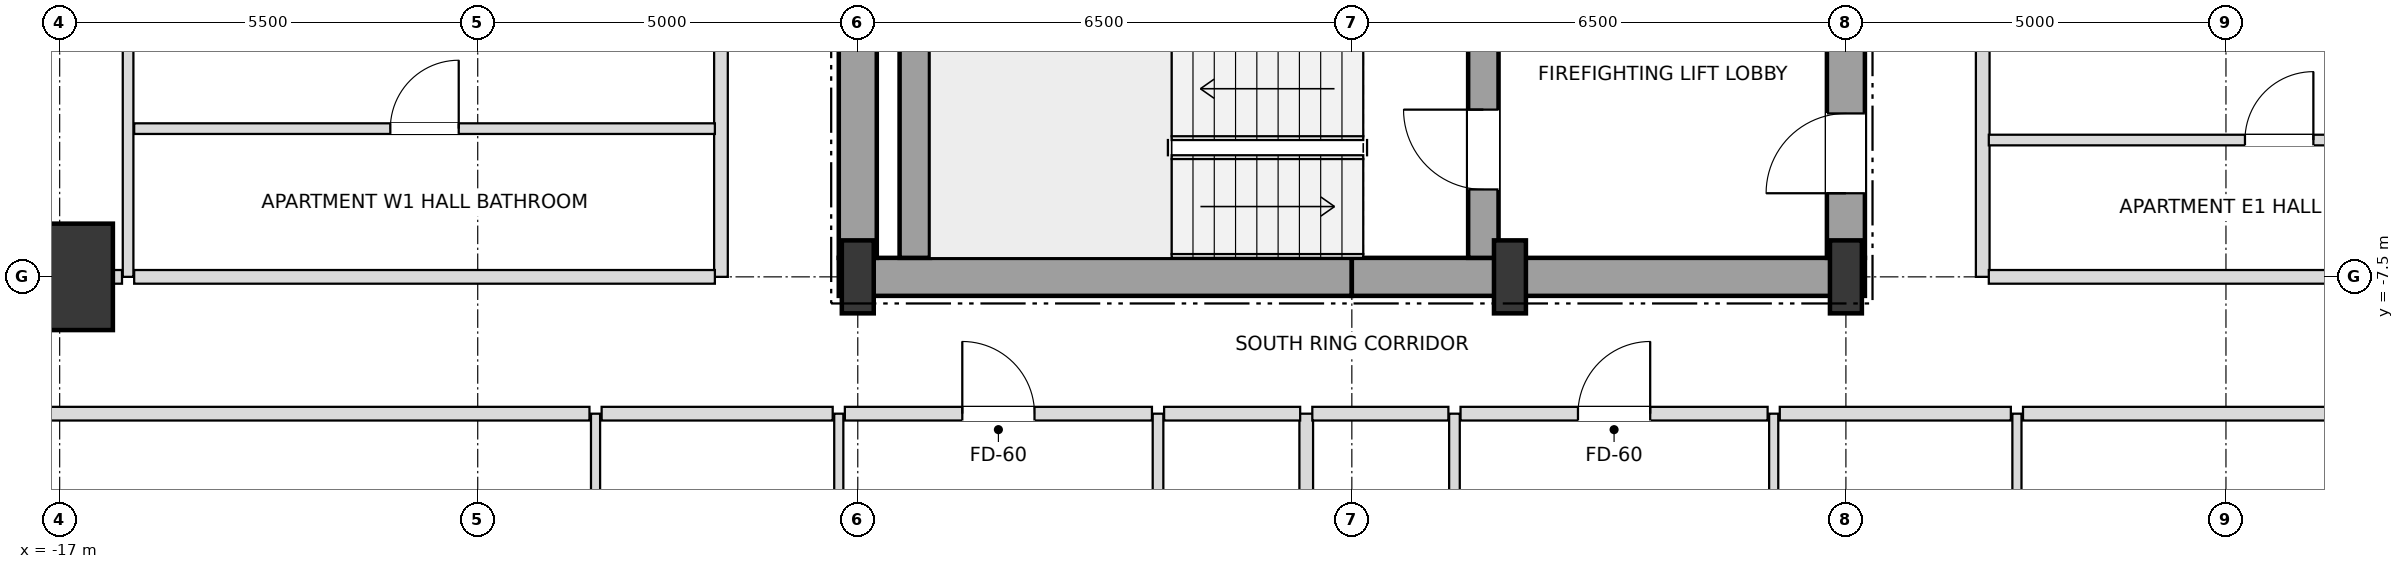
"""IFC4 building model, lengths in metres.
Left out: names, types, materials, properties, quantities, classifications, styles, units other than length and angle.
Written with IfcOpenShell. Run it as: python <this file> out.ifc"""

import sys

from ifc_helpers import new_model, si_unit, direction, frame, frame_2d, origin, origin_2d, place, context, subcontext, project, spatial, rectangle, i_section, extrude, element, fill, save


model = new_model("IFC4")
c1 = context("Model", 3, precision=1e-05, world=origin(), true_north=direction((0.0, 1.0)))
c2 = subcontext(c1, "Body", "Model", "MODEL_VIEW")
j1 = project(units=[si_unit("LENGTHUNIT", "METRE"), si_unit("PLANEANGLEUNIT", "RADIAN")], contexts=[c1])
p1 = place(None, origin())
s1 = spatial("IfcSite", under=j1, at=p1, CompositionType="ELEMENT")
p2 = place(p1, origin())
s2 = spatial("IfcBuilding", under=s1, at=p2, CompositionType="ELEMENT")
p3 = place(p2, frame((0.0, 0.0, 75.6)))
s3 = spatial("IfcBuildingStorey", under=s2, at=p3, CompositionType="ELEMENT", Elevation=75.6)
for number, where, z_axis, x_axis in (
    (1, (-6.5, -7.5, 0.0), (0.0, 0.0, 1.0), (1.0, 0.0, 0.0)),
    (2, (2.08, -7.5, 0.0), (0.0, 0.0, 1.0), (1.0, 0.0, 0.0)),
    (3, (6.5, -7.5, 0.0), (0.0, 0.0, 1.0), (1.0, 0.0, 0.0)),
):
    element("IfcColumn", number, at=place(p3, frame(where, z_axis=z_axis, x_axis=x_axis)), inside=s3, PredefinedType="COLUMN", context=c2, shape_type="SweptSolid", body=[
        extrude(i_section(OverallWidth=0.42, OverallDepth=0.96, WebThickness=0.022, FlangeThickness=0.034, at=origin_2d()), origin(), (0.0, 0.0, 1.0), 3.6),
    ])
p4 = place(p3, frame((-17.0, -7.5, 0.0), z_axis=(0.0, 0.0, 1.0), x_axis=(1.0, 0.0, 0.0)))
e4 = element("IfcColumn", 4, at=p4, inside=s3, PredefinedType="USERDEFINED", context=c2, shape_type="SweptSolid", body=[
    extrude(rectangle(XDim=1.4, YDim=1.4, at=origin_2d()), origin(), (0.0, 0.0, 1.0), 3.6),
])
for number, where, z_axis, x_axis in (
    (5, (-6.75, -7.5, 0.0), (0.0, 0.0, 1.0), (1.0, 0.0, 0.0)),
    (6, (0.0, -7.5, 0.0), (0.0, 0.0, 1.0), (1.0, 0.0, 0.0)),
):
    element("IfcWall", number, at=place(p3, frame(where, z_axis=z_axis, x_axis=x_axis)), inside=s3, PredefinedType="SHEAR", context=c2, shape_type="SweptSolid", body=[
        extrude(rectangle(XDim=6.75, YDim=0.5, at=frame_2d((3.375, 0.0))), origin(), (0.0, 0.0, 1.0), 3.38),
    ])
p5 = place(p3, frame((-6.5, -7.25, 0.0), z_axis=(0.0, 0.0, 1.0), x_axis=(0.0, 1.0, 0.0)))
e7 = element("IfcWall", 7, at=p5, inside=s3, PredefinedType="SHEAR", context=c2, shape_type="SweptSolid", body=[
    extrude(rectangle(XDim=3.55, YDim=0.5, at=frame_2d((1.775, 0.0))), origin(), (0.0, 0.0, 1.0), 3.38),
])
p6 = place(p3, frame((6.5, -7.25, 0.0), z_axis=(0.0, 0.0, 1.0), x_axis=(0.0, 1.0, 0.0)))
e8 = element("IfcWall", 8, at=p6, inside=s3, PredefinedType="SHEAR", context=c2, shape_type="SweptSolid", body=[
    extrude(rectangle(XDim=5.75, YDim=0.5, at=frame_2d((2.875, 0.0))), origin(), (0.0, 0.0, 1.0), 3.38),
])
p7 = place(p6, frame((0.85, 0.0, 0.0)))
e9 = element("IfcOpeningElement", 9, at=p7, cuts=e8, PredefinedType="OPENING", context=c2, shape_type="SweptSolid", body=[
    extrude(rectangle(XDim=1.05, YDim=2.15, at=frame_2d((0.525, 1.075))), frame((0.0, 0.26, 0.0), z_axis=(0.0, -1.0, 0.0), x_axis=(1.0, 0.0, 0.0)), (0.0, 0.0, 1.0), 0.52),
])
p8 = place(p3, frame((-5.75, -7.25, 0.0), z_axis=(0.0, 0.0, 1.0), x_axis=(0.0, 1.0, 0.0)))
e10 = element("IfcWall", 10, at=p8, inside=s3, PredefinedType="SHEAR", context=c2, shape_type="SweptSolid", body=[
    extrude(rectangle(XDim=2.9, YDim=0.4, at=frame_2d((1.45, 0.0))), origin(), (0.0, 0.0, 1.0), 3.38),
])
p9 = place(p3, frame((1.73, -7.25, 0.0), z_axis=(0.0, 0.0, 1.0), x_axis=(0.0, 1.0, 0.0)))
e11 = element("IfcWall", 11, at=p9, inside=s3, PredefinedType="SHEAR", context=c2, shape_type="SweptSolid", body=[
    extrude(rectangle(XDim=3.3, YDim=0.4, at=frame_2d((1.65, 0.0))), origin(), (0.0, 0.0, 1.0), 3.38),
])
p10 = place(p9, frame((0.9, 0.0, 0.0)))
e12 = element("IfcOpeningElement", 12, at=p10, cuts=e11, PredefinedType="OPENING", context=c2, shape_type="SweptSolid", body=[
    extrude(rectangle(XDim=1.05, YDim=2.15, at=frame_2d((0.525, 1.075))), frame((0.0, 0.21, 0.0), z_axis=(0.0, -1.0, 0.0), x_axis=(1.0, 0.0, 0.0)), (0.0, 0.0, 1.0), 0.42),
])
p11 = place(p3, frame((-16.1, -7.5, 0.0), z_axis=(0.0, 0.0, 1.0), x_axis=(0.0, 1.0, 0.0)))
e13 = element("IfcWall", 13, at=p11, inside=s3, PredefinedType="PARTITIONING", context=c2, shape_type="SweptSolid", body=[
    extrude(rectangle(XDim=15.0, YDim=0.14, at=frame_2d((7.5, 0.0))), origin(), (0.0, 0.0, 1.0), 3.38),
])
p12 = place(p11, frame((3.475, 0.0, 0.0)))
e14 = element("IfcOpeningElement", 14, at=p12, cuts=e13, PredefinedType="OPENING", context=c2, shape_type="SweptSolid", body=[
    extrude(rectangle(XDim=0.95, YDim=2.1, at=frame_2d((0.475, 1.05))), frame((0.0, 0.08, 0.0), z_axis=(0.0, -1.0, 0.0), x_axis=(1.0, 0.0, 0.0)), (0.0, 0.0, 1.0), 0.16),
])
p13 = place(p3, frame((-9.95, -18.9, 0.0), z_axis=(0.0, 0.0, 1.0), x_axis=(0.0, 1.0, 0.0)))
e15 = element("IfcWall", 15, at=p13, inside=s3, PredefinedType="PARTITIONING", context=c2, shape_type="SweptSolid", body=[
    extrude(rectangle(XDim=9.6, YDim=0.12, at=frame_2d((4.8, 0.0))), origin(), (0.0, 0.0, 1.0), 2.816),
])
p14 = place(p13, frame((4.35, 0.0, 0.0)))
e16 = element("IfcOpeningElement", 16, at=p14, cuts=e15, PredefinedType="OPENING", context=c2, shape_type="SweptSolid", body=[
    extrude(rectangle(XDim=0.9, YDim=2.1, at=frame_2d((0.45, 1.05))), frame((0.0, 0.07, 0.0), z_axis=(0.0, -1.0, 0.0), x_axis=(1.0, 0.0, 0.0)), (0.0, 0.0, 1.0), 0.14),
])
p15 = place(p3, frame((-8.3, -7.5, 0.0), z_axis=(0.0, 0.0, 1.0), x_axis=(0.0, 1.0, 0.0)))
e17 = element("IfcWall", 17, at=p15, inside=s3, PredefinedType="PARTITIONING", context=c2, shape_type="SweptSolid", body=[
    extrude(rectangle(XDim=15.0, YDim=0.18, at=frame_2d((7.5, 0.0))), origin(), (0.0, 0.0, 1.0), 3.38),
])
p16 = place(p15, frame((3.475, 0.0, 0.0)))
e18 = element("IfcOpeningElement", 18, at=p16, cuts=e17, PredefinedType="OPENING", context=c2, shape_type="SweptSolid", body=[
    extrude(rectangle(XDim=0.95, YDim=2.15, at=frame_2d((0.475, 1.075))), frame((0.0, 0.1, 0.0), z_axis=(0.0, -1.0, 0.0), x_axis=(1.0, 0.0, 0.0)), (0.0, 0.0, 1.0), 0.2),
])
p17 = place(p3, frame((-6.75, -24.9, 0.0), z_axis=(0.0, 0.0, 1.0), x_axis=(0.0, 1.0, 0.0)))
e19 = element("IfcWall", 19, at=p17, inside=s3, PredefinedType="PARTITIONING", context=c2, shape_type="SweptSolid", body=[
    extrude(rectangle(XDim=15.6, YDim=0.12, at=frame_2d((7.8, 0.0))), origin(), (0.0, 0.0, 1.0), 2.816),
])
p18 = place(p17, frame((10.325, 0.0, 0.0)))
e20 = element("IfcOpeningElement", 20, at=p18, cuts=e19, PredefinedType="OPENING", context=c2, shape_type="SweptSolid", body=[
    extrude(rectangle(XDim=0.95, YDim=2.1, at=frame_2d((0.475, 1.05))), frame((0.0, 0.07, 0.0), z_axis=(0.0, -1.0, 0.0), x_axis=(1.0, 0.0, 0.0)), (0.0, 0.0, 1.0), 0.14),
])
p19 = place(p17, frame((2.55, 0.0, 0.0)))
e21 = element("IfcOpeningElement", 21, at=p19, cuts=e19, PredefinedType="OPENING", context=c2, shape_type="SweptSolid", body=[
    extrude(rectangle(XDim=0.9, YDim=2.1, at=frame_2d((0.45, 1.05))), frame((0.0, 0.07, 0.0), z_axis=(0.0, -1.0, 0.0), x_axis=(1.0, 0.0, 0.0)), (0.0, 0.0, 1.0), 0.14),
])
p20 = place(p3, frame((-2.55, -18.9, 0.0), z_axis=(0.0, 0.0, 1.0), x_axis=(0.0, 1.0, 0.0)))
e22 = element("IfcWall", 22, at=p20, inside=s3, PredefinedType="PARTITIONING", context=c2, shape_type="SweptSolid", body=[
    extrude(rectangle(XDim=9.6, YDim=0.14, at=frame_2d((4.8, 0.0))), origin(), (0.0, 0.0, 1.0), 2.948),
])
p21 = place(p20, frame((4.35, 0.0, 0.0)))
e23 = element("IfcOpeningElement", 23, at=p21, cuts=e22, PredefinedType="OPENING", context=c2, shape_type="SweptSolid", body=[
    extrude(rectangle(XDim=0.9, YDim=2.1, at=frame_2d((0.45, 1.05))), frame((0.0, 0.08, 0.0), z_axis=(0.0, -1.0, 0.0), x_axis=(1.0, 0.0, 0.0)), (0.0, 0.0, 1.0), 0.16),
])
p22 = place(p3, frame((-0.6, -24.9, 0.0), z_axis=(0.0, 0.0, 1.0), x_axis=(0.0, 1.0, 0.0)))
e24 = element("IfcWall", 24, at=p22, inside=s3, PredefinedType="PARTITIONING", context=c2, shape_type="SweptSolid", body=[
    extrude(rectangle(XDim=15.6, YDim=0.18, at=frame_2d((7.8, 0.0))), origin(), (0.0, 0.0, 1.0), 2.816),
])
p23 = place(p3, frame((1.35, -18.9, 0.0), z_axis=(0.0, 0.0, 1.0), x_axis=(0.0, 1.0, 0.0)))
e25 = element("IfcWall", 25, at=p23, inside=s3, PredefinedType="PARTITIONING", context=c2, shape_type="SweptSolid", body=[
    extrude(rectangle(XDim=9.6, YDim=0.14, at=frame_2d((4.8, 0.0))), origin(), (0.0, 0.0, 1.0), 2.948),
])
p24 = place(p23, frame((4.35, 0.0, 0.0)))
e26 = element("IfcOpeningElement", 26, at=p24, cuts=e25, PredefinedType="OPENING", context=c2, shape_type="SweptSolid", body=[
    extrude(rectangle(XDim=0.9, YDim=2.1, at=frame_2d((0.45, 1.05))), frame((0.0, 0.08, 0.0), z_axis=(0.0, -1.0, 0.0), x_axis=(1.0, 0.0, 0.0)), (0.0, 0.0, 1.0), 0.16),
])
p25 = place(p3, frame((5.55, -24.9, 0.0), z_axis=(0.0, 0.0, 1.0), x_axis=(0.0, 1.0, 0.0)))
e27 = element("IfcWall", 27, at=p25, inside=s3, PredefinedType="PARTITIONING", context=c2, shape_type="SweptSolid", body=[
    extrude(rectangle(XDim=15.6, YDim=0.12, at=frame_2d((7.8, 0.0))), origin(), (0.0, 0.0, 1.0), 2.816),
])
p26 = place(p25, frame((10.325, 0.0, 0.0)))
e28 = element("IfcOpeningElement", 28, at=p26, cuts=e27, PredefinedType="OPENING", context=c2, shape_type="SweptSolid", body=[
    extrude(rectangle(XDim=0.95, YDim=2.1, at=frame_2d((0.475, 1.05))), frame((0.0, 0.07, 0.0), z_axis=(0.0, -1.0, 0.0), x_axis=(1.0, 0.0, 0.0)), (0.0, 0.0, 1.0), 0.14),
])
p27 = place(p25, frame((2.55, 0.0, 0.0)))
e29 = element("IfcOpeningElement", 29, at=p27, cuts=e27, PredefinedType="OPENING", context=c2, shape_type="SweptSolid", body=[
    extrude(rectangle(XDim=0.9, YDim=2.1, at=frame_2d((0.45, 1.05))), frame((0.0, 0.07, 0.0), z_axis=(0.0, -1.0, 0.0), x_axis=(1.0, 0.0, 0.0)), (0.0, 0.0, 1.0), 0.14),
])
p28 = place(p3, frame((8.3, -7.5, 0.0), z_axis=(0.0, 0.0, 1.0), x_axis=(0.0, 1.0, 0.0)))
e30 = element("IfcWall", 30, at=p28, inside=s3, PredefinedType="PARTITIONING", context=c2, shape_type="SweptSolid", body=[
    extrude(rectangle(XDim=15.0, YDim=0.18, at=frame_2d((7.5, 0.0))), origin(), (0.0, 0.0, 1.0), 3.38),
])
p29 = place(p28, frame((3.305, 0.0, 0.0)))
e31 = element("IfcOpeningElement", 31, at=p29, cuts=e30, PredefinedType="OPENING", context=c2, shape_type="SweptSolid", body=[
    extrude(rectangle(XDim=0.95, YDim=2.15, at=frame_2d((0.475, 1.075))), frame((0.0, 0.1, 0.0), z_axis=(0.0, -1.0, 0.0), x_axis=(1.0, 0.0, 0.0)), (0.0, 0.0, 1.0), 0.2),
])
p30 = place(p28, frame((10.805, 0.0, 0.0)))
e32 = element("IfcOpeningElement", 32, at=p30, cuts=e30, PredefinedType="OPENING", context=c2, shape_type="SweptSolid", body=[
    extrude(rectangle(XDim=0.95, YDim=2.15, at=frame_2d((0.475, 1.075))), frame((0.0, 0.1, 0.0), z_axis=(0.0, -1.0, 0.0), x_axis=(1.0, 0.0, 0.0)), (0.0, 0.0, 1.0), 0.2),
])
p31 = place(p3, frame((8.75, -24.9, 0.0), z_axis=(0.0, 0.0, 1.0), x_axis=(0.0, 1.0, 0.0)))
e33 = element("IfcWall", 33, at=p31, inside=s3, PredefinedType="PARTITIONING", context=c2, shape_type="SweptSolid", body=[
    extrude(rectangle(XDim=15.6, YDim=0.12, at=frame_2d((7.8, 0.0))), origin(), (0.0, 0.0, 1.0), 2.816),
])
p32 = place(p31, frame((10.325, 0.0, 0.0)))
e34 = element("IfcOpeningElement", 34, at=p32, cuts=e33, PredefinedType="OPENING", context=c2, shape_type="SweptSolid", body=[
    extrude(rectangle(XDim=0.95, YDim=2.1, at=frame_2d((0.475, 1.05))), frame((0.0, 0.07, 0.0), z_axis=(0.0, -1.0, 0.0), x_axis=(1.0, 0.0, 0.0)), (0.0, 0.0, 1.0), 0.14),
])
p33 = place(p31, frame((2.55, 0.0, 0.0)))
e35 = element("IfcOpeningElement", 35, at=p33, cuts=e33, PredefinedType="OPENING", context=c2, shape_type="SweptSolid", body=[
    extrude(rectangle(XDim=0.9, YDim=2.1, at=frame_2d((0.45, 1.05))), frame((0.0, 0.07, 0.0), z_axis=(0.0, -1.0, 0.0), x_axis=(1.0, 0.0, 0.0)), (0.0, 0.0, 1.0), 0.14),
])
p34 = place(p3, frame((-18.32, -9.3, 0.0), z_axis=(0.0, 0.0, 1.0), x_axis=(1.0, 0.0, 0.0)))
e36 = element("IfcWall", 36, at=p34, inside=s3, PredefinedType="PARTITIONING", context=c2, shape_type="SweptSolid", body=[
    extrude(rectangle(XDim=8.29, YDim=0.18, at=frame_2d((4.145, 0.0))), origin(), (0.0, 0.0, 1.0), 2.816),
])
p35 = place(p3, frame((-9.87, -9.3, 0.0), z_axis=(0.0, 0.0, 1.0), x_axis=(1.0, 0.0, 0.0)))
e37 = element("IfcWall", 37, at=p35, inside=s3, PredefinedType="PARTITIONING", context=c2, shape_type="SweptSolid", body=[
    extrude(rectangle(XDim=3.04, YDim=0.18, at=frame_2d((1.52, 0.0))), origin(), (0.0, 0.0, 1.0), 3.38),
])
p36 = place(p3, frame((-6.67, -9.3, 0.0), z_axis=(0.0, 0.0, 1.0), x_axis=(1.0, 0.0, 0.0)))
e38 = element("IfcWall", 38, at=p36, inside=s3, PredefinedType="PARTITIONING", context=c2, shape_type="SweptSolid", body=[
    extrude(rectangle(XDim=4.04, YDim=0.18, at=frame_2d((2.02, 0.0))), origin(), (0.0, 0.0, 1.0), 2.816),
])
p37 = place(p36, frame((1.545, 0.0, 0.0)))
e39 = element("IfcOpeningElement", 39, at=p37, cuts=e38, PredefinedType="OPENING", context=c2, shape_type="SweptSolid", body=[
    extrude(rectangle(XDim=0.95, YDim=2.15, at=frame_2d((0.475, 1.075))), frame((0.0, 0.1, 0.0), z_axis=(0.0, -1.0, 0.0), x_axis=(1.0, 0.0, 0.0)), (0.0, 0.0, 1.0), 0.2),
])
for number, where, z_axis, x_axis in (
    (40, (-2.47, -9.3, 0.0), (0.0, 0.0, 1.0), (1.0, 0.0, 0.0)),
    (41, (-0.52, -9.3, 0.0), (0.0, 0.0, 1.0), (1.0, 0.0, 0.0)),
):
    element("IfcWall", number, at=place(p3, frame(where, z_axis=z_axis, x_axis=x_axis)), inside=s3, PredefinedType="PARTITIONING", context=c2, shape_type="SweptSolid", body=[
        extrude(rectangle(XDim=1.79, YDim=0.18, at=frame_2d((0.895, 0.0))), origin(), (0.0, 0.0, 1.0), 3.38),
    ])
p38 = place(p3, frame((1.43, -9.3, 0.0), z_axis=(0.0, 0.0, 1.0), x_axis=(1.0, 0.0, 0.0)))
e42 = element("IfcWall", 42, at=p38, inside=s3, PredefinedType="PARTITIONING", context=c2, shape_type="SweptSolid", body=[
    extrude(rectangle(XDim=4.04, YDim=0.18, at=frame_2d((2.02, 0.0))), origin(), (0.0, 0.0, 1.0), 3.38),
])
p39 = place(p38, frame((1.545, 0.0, 0.0)))
e43 = element("IfcOpeningElement", 43, at=p39, cuts=e42, PredefinedType="OPENING", context=c2, shape_type="SweptSolid", body=[
    extrude(rectangle(XDim=0.95, YDim=2.15, at=frame_2d((0.475, 1.075))), frame((0.0, 0.1, 0.0), z_axis=(0.0, -1.0, 0.0), x_axis=(1.0, 0.0, 0.0)), (0.0, 0.0, 1.0), 0.2),
])
p40 = place(p3, frame((5.63, -9.3, 0.0), z_axis=(0.0, 0.0, 1.0), x_axis=(1.0, 0.0, 0.0)))
e44 = element("IfcWall", 44, at=p40, inside=s3, PredefinedType="PARTITIONING", context=c2, shape_type="SweptSolid", body=[
    extrude(rectangle(XDim=3.04, YDim=0.18, at=frame_2d((1.52, 0.0))), origin(), (0.0, 0.0, 1.0), 2.816),
])
p41 = place(p3, frame((8.83, -9.3, 0.0), z_axis=(0.0, 0.0, 1.0), x_axis=(1.0, 0.0, 0.0)))
e45 = element("IfcWall", 45, at=p41, inside=s3, PredefinedType="PARTITIONING", context=c2, shape_type="SweptSolid", body=[
    extrude(rectangle(XDim=9.49, YDim=0.18, at=frame_2d((4.745, 0.0))), origin(), (0.0, 0.0, 1.0), 2.816),
])
p42 = place(p3, frame((-21.9, -7.5, 0.0), z_axis=(0.0, 0.0, 1.0), x_axis=(1.0, 0.0, 0.0)))
e46 = element("IfcWall", 46, at=p42, inside=s3, PredefinedType="PARTITIONING", context=c2, shape_type="SweptSolid", body=[
    extrude(rectangle(XDim=5.72, YDim=0.18, at=frame_2d((2.86, 0.0))), origin(), (0.0, 0.0, 1.0), 2.816),
])
for number, where, z_axis, x_axis in (
    (47, (-16.02, -7.5, 0.0), (0.0, 0.0, 1.0), (1.0, 0.0, 0.0)),
    (48, (8.38, -7.5, 0.0), (0.0, 0.0, 1.0), (1.0, 0.0, 0.0)),
):
    element("IfcWall", number, at=place(p3, frame(where, z_axis=z_axis, x_axis=x_axis)), inside=s3, PredefinedType="PARTITIONING", context=c2, shape_type="SweptSolid", body=[
        extrude(rectangle(XDim=7.64, YDim=0.18, at=frame_2d((3.82, 0.0))), origin(), (0.0, 0.0, 1.0), 2.816),
    ])
p43 = place(p3, frame((8.38, -5.7, 0.0), z_axis=(0.0, 0.0, 1.0), x_axis=(1.0, 0.0, 0.0)))
e49 = element("IfcWall", 49, at=p43, inside=s3, PredefinedType="PARTITIONING", context=c2, shape_type="SweptSolid", body=[
    extrude(rectangle(XDim=7.64, YDim=0.14, at=frame_2d((3.82, 0.0))), origin(), (0.0, 0.0, 1.0), 2.948),
])
p44 = place(p43, frame((3.37, 0.0, 0.0)))
e50 = element("IfcOpeningElement", 50, at=p44, cuts=e49, PredefinedType="OPENING", context=c2, shape_type="SweptSolid", body=[
    extrude(rectangle(XDim=0.9, YDim=2.1, at=frame_2d((0.45, 1.05))), frame((0.0, 0.08, 0.0), z_axis=(0.0, -1.0, 0.0), x_axis=(1.0, 0.0, 0.0)), (0.0, 0.0, 1.0), 0.16),
])
p45 = place(p3, frame((-16.02, -5.55, 0.0), z_axis=(0.0, 0.0, 1.0), x_axis=(1.0, 0.0, 0.0)))
e51 = element("IfcWall", 51, at=p45, inside=s3, PredefinedType="PARTITIONING", context=c2, shape_type="SweptSolid", body=[
    extrude(rectangle(XDim=7.64, YDim=0.14, at=frame_2d((3.82, 0.0))), origin(), (0.0, 0.0, 1.0), 2.948),
])
p46 = place(p45, frame((3.37, 0.0, 0.0)))
e52 = element("IfcOpeningElement", 52, at=p46, cuts=e51, PredefinedType="OPENING", context=c2, shape_type="SweptSolid", body=[
    extrude(rectangle(XDim=0.9, YDim=2.1, at=frame_2d((0.45, 1.05))), frame((0.0, 0.08, 0.0), z_axis=(0.0, -1.0, 0.0), x_axis=(1.0, 0.0, 0.0)), (0.0, 0.0, 1.0), 0.16),
])
p47 = place(p7, origin())
e53 = element("IfcDoor", 53, at=p47, inside=s3, OperationType="SINGLE_SWING_LEFT", PredefinedType="DOOR", context=c2, shape_type="SweptSolid", body=[
    extrude(rectangle(XDim=1.05, YDim=2.15, at=frame_2d((0.525, 1.075))), frame((0.0, 0.025, 0.0), z_axis=(0.0, -1.0, 0.0), x_axis=(1.0, 0.0, 0.0)), (0.0, 0.0, 1.0), 0.05),
])
fill(e9, e53)
p48 = place(p10, origin())
e54 = element("IfcDoor", 54, at=p48, inside=s3, OperationType="SINGLE_SWING_RIGHT", PredefinedType="DOOR", context=c2, shape_type="SweptSolid", body=[
    extrude(rectangle(XDim=1.05, YDim=2.15, at=frame_2d((0.525, 1.075))), frame((0.0, 0.025, 0.0), z_axis=(0.0, -1.0, 0.0), x_axis=(1.0, 0.0, 0.0)), (0.0, 0.0, 1.0), 0.05),
])
fill(e12, e54)
p49 = place(p37, origin())
e55 = element("IfcDoor", 55, at=p49, inside=s3, OperationType="SINGLE_SWING_LEFT", PredefinedType="DOOR", context=c2, shape_type="SweptSolid", body=[
    extrude(rectangle(XDim=0.95, YDim=2.15, at=frame_2d((0.475, 1.075))), frame((0.0, 0.025, 0.0), z_axis=(0.0, -1.0, 0.0), x_axis=(1.0, 0.0, 0.0)), (0.0, 0.0, 1.0), 0.05),
])
fill(e39, e55)
p50 = place(p39, origin())
e56 = element("IfcDoor", 56, at=p50, inside=s3, OperationType="SINGLE_SWING_RIGHT", PredefinedType="DOOR", context=c2, shape_type="SweptSolid", body=[
    extrude(rectangle(XDim=0.95, YDim=2.15, at=frame_2d((0.475, 1.075))), frame((0.0, 0.025, 0.0), z_axis=(0.0, -1.0, 0.0), x_axis=(1.0, 0.0, 0.0)), (0.0, 0.0, 1.0), 0.05),
])
fill(e43, e56)
p51 = place(p46, origin())
e57 = element("IfcDoor", 57, at=p51, inside=s3, OperationType="SINGLE_SWING_RIGHT", PredefinedType="DOOR", context=c2, shape_type="SweptSolid", body=[
    extrude(rectangle(XDim=0.9, YDim=2.1, at=frame_2d((0.45, 1.05))), frame((0.0, 0.025, 0.0), z_axis=(0.0, -1.0, 0.0), x_axis=(1.0, 0.0, 0.0)), (0.0, 0.0, 1.0), 0.05),
])
fill(e52, e57)
p52 = place(p44, origin())
e58 = element("IfcDoor", 58, at=p52, inside=s3, OperationType="SINGLE_SWING_RIGHT", PredefinedType="DOOR", context=c2, shape_type="SweptSolid", body=[
    extrude(rectangle(XDim=0.9, YDim=2.1, at=frame_2d((0.45, 1.05))), frame((0.0, 0.025, 0.0), z_axis=(0.0, -1.0, 0.0), x_axis=(1.0, 0.0, 0.0)), (0.0, 0.0, 1.0), 0.05),
])
fill(e50, e58)
save(model, sys.argv[1])
